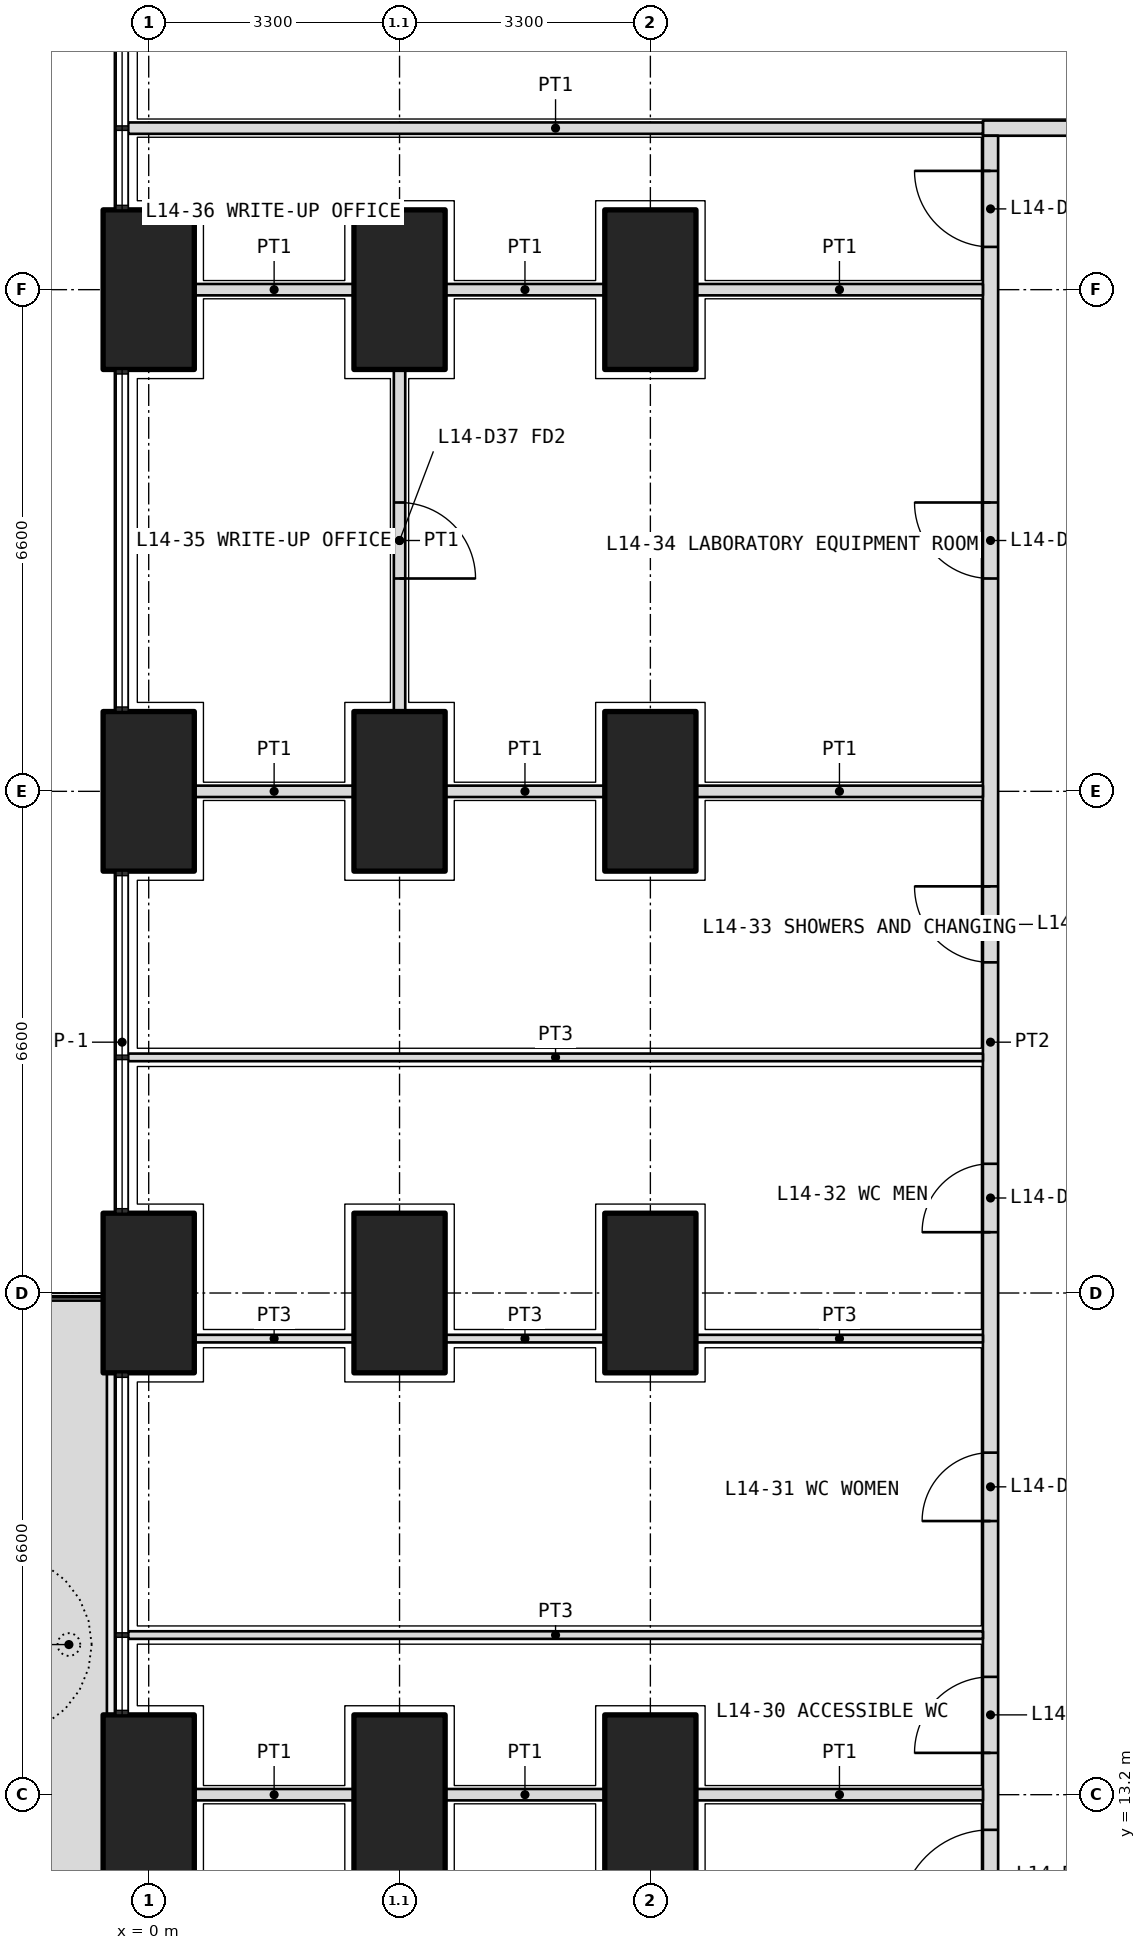
"""IFC4 building model, lengths in metres.
Left out: names, types, materials, properties, quantities, classifications, styles, units other than length and angle.
Written with IfcOpenShell. Run it as: python <this file> out.ifc"""

import sys

from ifc_helpers import new_model, si_unit, direction, frame, frame_2d, origin, origin_2d, place, context, subcontext, project, spatial, polyline, rectangle, outline, extrude, element, fill, save


model = new_model("IFC4")
c1 = context("Model", 3, precision=1e-05, world=origin(), true_north=direction((0.0, 1.0)))
c2 = subcontext(c1, "Body", "Model", "MODEL_VIEW")
j1 = project(units=[si_unit("LENGTHUNIT", "METRE"), si_unit("PLANEANGLEUNIT", "RADIAN")], contexts=[c1])
p1 = place(None, origin())
s1 = spatial("IfcSite", under=j1, at=p1, CompositionType="ELEMENT")
p2 = place(p1, origin())
s2 = spatial("IfcBuilding", under=s1, at=p2, CompositionType="ELEMENT")
p3 = place(p2, frame((0.0, 0.0, 63.3)))
s3 = spatial("IfcBuildingStorey", under=s2, at=p3, CompositionType="ELEMENT", Elevation=63.3)
for number, where, z_axis, x_axis in (
    (1, (0.0, 13.2, 0.0), (0.0, 0.0, 1.0), (0.0, 1.0, 0.0)),
    (2, (0.0, 19.8, 0.0), (0.0, 0.0, 1.0), (0.0, 1.0, 0.0)),
    (3, (0.0, 26.4, 0.0), (0.0, 0.0, 1.0), (0.0, 1.0, 0.0)),
    (4, (0.0, 33.0, 0.0), (0.0, 0.0, 1.0), (0.0, 1.0, 0.0)),
    (5, (3.3, 13.2, 0.0), (0.0, 0.0, 1.0), (0.0, 1.0, 0.0)),
    (6, (3.3, 19.8, 0.0), (0.0, 0.0, 1.0), (0.0, 1.0, 0.0)),
    (7, (3.3, 26.4, 0.0), (0.0, 0.0, 1.0), (0.0, 1.0, 0.0)),
    (8, (3.3, 33.0, 0.0), (0.0, 0.0, 1.0), (0.0, 1.0, 0.0)),
    (9, (6.6, 13.2, 0.0), (0.0, 0.0, 1.0), (0.0, 1.0, 0.0)),
    (10, (6.6, 19.8, 0.0), (0.0, 0.0, 1.0), (0.0, 1.0, 0.0)),
    (11, (6.6, 26.4, 0.0), (0.0, 0.0, 1.0), (0.0, 1.0, 0.0)),
    (12, (6.6, 33.0, 0.0), (0.0, 0.0, 1.0), (0.0, 1.0, 0.0)),
):
    element("IfcColumn", number, at=place(p3, frame(where, z_axis=z_axis, x_axis=x_axis)), inside=s3, PredefinedType="COLUMN", context=c2, shape_type="SweptSolid", body=[
        extrude(rectangle(XDim=2.1, YDim=1.2, at=origin_2d()), origin(), (0.0, 0.0, 1.0), 4.2),
    ])
p4 = place(p3, origin())
e13 = element("IfcWall", 13, at=p4, inside=s3, PredefinedType="USERDEFINED", context=c2, shape_type="SweptSolid", body=[
    extrude(outline(polyline([(-1.55, 10.65), (-0.55, 10.65), (-0.55, 19.7), (-1.55, 19.7), (-1.55, 10.65)]), holes=[polyline([(-1.4, 10.8), (-0.7, 10.8), (-0.7, 19.55), (-1.4, 19.55), (-1.4, 10.8)])]), origin(), (0.0, 0.0, 1.0), 1.05),
])
p5 = place(p3, frame((10.975, 35.125, 0.0), z_axis=(0.0, 0.0, 1.0), x_axis=(1.0, 0.0, 0.0)))
e14 = element("IfcWall", 14, at=p5, inside=s3, PredefinedType="PARTITIONING", context=c2, shape_type="SweptSolid", body=[
    extrude(rectangle(XDim=30.85, YDim=0.2, at=frame_2d((15.425, 0.0))), origin(), (0.0, 0.0, 1.0), 2.85),
])
p6 = place(p5, frame((2.312, 0.0, 0.0)))
e15 = element("IfcOpeningElement", 15, at=p6, cuts=e14, PredefinedType="OPENING", context=c2, shape_type="SweptSolid", body=[
    extrude(rectangle(XDim=1.0, YDim=2.1, at=frame_2d((0.5, 1.05))), frame((0.0, 0.11, 0.0), z_axis=(0.0, -1.0, 0.0), x_axis=(1.0, 0.0, 0.0)), (0.0, 0.0, 1.0), 0.22),
])
p7 = place(p5, frame((13.175, 0.0, 0.0)))
e16 = element("IfcOpeningElement", 16, at=p7, cuts=e14, PredefinedType="OPENING", context=c2, shape_type="SweptSolid", body=[
    extrude(rectangle(XDim=1.2, YDim=2.1, at=frame_2d((0.6, 1.05))), frame((0.0, 0.11, 0.0), z_axis=(0.0, -1.0, 0.0), x_axis=(1.0, 0.0, 0.0)), (0.0, 0.0, 1.0), 0.22),
])
p8 = place(p5, frame((25.788, 0.0, 0.0)))
e17 = element("IfcOpeningElement", 17, at=p8, cuts=e14, PredefinedType="OPENING", context=c2, shape_type="SweptSolid", body=[
    extrude(rectangle(XDim=1.2, YDim=2.1, at=frame_2d((0.6, 1.05))), frame((0.0, 0.11, 0.0), z_axis=(0.0, -1.0, 0.0), x_axis=(1.0, 0.0, 0.0)), (0.0, 0.0, 1.0), 0.22),
])
p9 = place(p3, frame((11.075, 11.175, 0.0), z_axis=(0.0, 0.0, 1.0), x_axis=(0.0, 1.0, 0.0)))
e18 = element("IfcWall", 18, at=p9, inside=s3, PredefinedType="PARTITIONING", context=c2, shape_type="SweptSolid", body=[
    extrude(rectangle(XDim=23.85, YDim=0.2, at=frame_2d((11.925, 0.0))), origin(), (0.0, 0.0, 1.0), 2.85),
])
p10 = place(p9, frame((0.363, 0.0, 0.0)))
e19 = element("IfcOpeningElement", 19, at=p10, cuts=e18, PredefinedType="OPENING", context=c2, shape_type="SweptSolid", body=[
    extrude(rectangle(XDim=1.2, YDim=2.1, at=frame_2d((0.6, 1.05))), frame((0.0, 0.11, 0.0), z_axis=(0.0, -1.0, 0.0), x_axis=(1.0, 0.0, 0.0)), (0.0, 0.0, 1.0), 0.22),
])
p11 = place(p9, frame((2.575, 0.0, 0.0)))
e20 = element("IfcOpeningElement", 20, at=p11, cuts=e18, PredefinedType="OPENING", context=c2, shape_type="SweptSolid", body=[
    extrude(rectangle(XDim=1.0, YDim=2.1, at=frame_2d((0.5, 1.05))), frame((0.0, 0.11, 0.0), z_axis=(0.0, -1.0, 0.0), x_axis=(1.0, 0.0, 0.0)), (0.0, 0.0, 1.0), 0.22),
])
p12 = place(p9, frame((5.625, 0.0, 0.0)))
e21 = element("IfcOpeningElement", 21, at=p12, cuts=e18, PredefinedType="OPENING", context=c2, shape_type="SweptSolid", body=[
    extrude(rectangle(XDim=0.9, YDim=2.1, at=frame_2d((0.45, 1.05))), frame((0.0, 0.11, 0.0), z_axis=(0.0, -1.0, 0.0), x_axis=(1.0, 0.0, 0.0)), (0.0, 0.0, 1.0), 0.22),
])
p13 = place(p9, frame((9.425, 0.0, 0.0)))
e22 = element("IfcOpeningElement", 22, at=p13, cuts=e18, PredefinedType="OPENING", context=c2, shape_type="SweptSolid", body=[
    extrude(rectangle(XDim=0.9, YDim=2.1, at=frame_2d((0.45, 1.05))), frame((0.0, 0.11, 0.0), z_axis=(0.0, -1.0, 0.0), x_axis=(1.0, 0.0, 0.0)), (0.0, 0.0, 1.0), 0.22),
])
p14 = place(p9, frame((12.975, 0.0, 0.0)))
e23 = element("IfcOpeningElement", 23, at=p14, cuts=e18, PredefinedType="OPENING", context=c2, shape_type="SweptSolid", body=[
    extrude(rectangle(XDim=1.0, YDim=2.1, at=frame_2d((0.5, 1.05))), frame((0.0, 0.11, 0.0), z_axis=(0.0, -1.0, 0.0), x_axis=(1.0, 0.0, 0.0)), (0.0, 0.0, 1.0), 0.22),
])
p15 = place(p9, frame((18.025, 0.0, 0.0)))
e24 = element("IfcOpeningElement", 24, at=p15, cuts=e18, PredefinedType="OPENING", context=c2, shape_type="SweptSolid", body=[
    extrude(rectangle(XDim=1.0, YDim=2.1, at=frame_2d((0.5, 1.05))), frame((0.0, 0.11, 0.0), z_axis=(0.0, -1.0, 0.0), x_axis=(1.0, 0.0, 0.0)), (0.0, 0.0, 1.0), 0.22),
])
p16 = place(p9, frame((22.387, 0.0, 0.0)))
e25 = element("IfcOpeningElement", 25, at=p16, cuts=e18, PredefinedType="OPENING", context=c2, shape_type="SweptSolid", body=[
    extrude(rectangle(XDim=1.0, YDim=2.1, at=frame_2d((0.5, 1.05))), frame((0.0, 0.11, 0.0), z_axis=(0.0, -1.0, 0.0), x_axis=(1.0, 0.0, 0.0)), (0.0, 0.0, 1.0), 0.22),
])
p17 = place(p3, frame((-0.27, 35.125, 0.0), z_axis=(0.0, 0.0, 1.0), x_axis=(1.0, 0.0, 0.0)))
e26 = element("IfcWall", 26, at=p17, inside=s3, PredefinedType="PARTITIONING", context=c2, shape_type="SweptSolid", body=[
    extrude(rectangle(XDim=11.245, YDim=0.15, at=frame_2d((5.623, 0.0))), origin(), (0.0, 0.0, 1.0), 2.6),
])
p18 = place(p3, frame((3.3, 31.95, 0.0), z_axis=(0.0, 0.0, 1.0), x_axis=(0.0, -1.0, 0.0)))
e27 = element("IfcWall", 27, at=p18, inside=s3, PredefinedType="PARTITIONING", context=c2, shape_type="SweptSolid", body=[
    extrude(rectangle(XDim=4.5, YDim=0.15, at=frame_2d((2.25, 0.0))), origin(), (0.0, 0.0, 1.0), 3.9),
])
p19 = place(p18, frame((1.75, 0.0, 0.0)))
e28 = element("IfcOpeningElement", 28, at=p19, cuts=e27, PredefinedType="OPENING", context=c2, shape_type="SweptSolid", body=[
    extrude(rectangle(XDim=1.0, YDim=2.1, at=frame_2d((0.5, 1.05))), frame((0.0, 0.085, 0.0), z_axis=(0.0, -1.0, 0.0), x_axis=(1.0, 0.0, 0.0)), (0.0, 0.0, 1.0), 0.17),
])
p20 = place(p3, frame((-0.27, 15.3, 0.0), z_axis=(0.0, 0.0, 1.0), x_axis=(1.0, 0.0, 0.0)))
e29 = element("IfcWall", 29, at=p20, inside=s3, PredefinedType="PARTITIONING", context=c2, shape_type="SweptSolid", body=[
    extrude(rectangle(XDim=11.245, YDim=0.1, at=frame_2d((5.623, 0.0))), origin(), (0.0, 0.0, 1.0), 2.6),
])
p21 = place(p3, frame((0.6, 19.2, 0.0), z_axis=(0.0, 0.0, 1.0), x_axis=(1.0, 0.0, 0.0)))
e30 = element("IfcWall", 30, at=p21, inside=s3, PredefinedType="PARTITIONING", context=c2, shape_type="SweptSolid", body=[
    extrude(rectangle(XDim=2.1, YDim=0.1, at=frame_2d((1.05, 0.0))), origin(), (0.0, 0.0, 1.0), 2.85),
])
p22 = place(p3, frame((3.9, 19.2, 0.0), z_axis=(0.0, 0.0, 1.0), x_axis=(1.0, 0.0, 0.0)))
e31 = element("IfcWall", 31, at=p22, inside=s3, PredefinedType="PARTITIONING", context=c2, shape_type="SweptSolid", body=[
    extrude(rectangle(XDim=2.1, YDim=0.1, at=frame_2d((1.05, 0.0))), origin(), (0.0, 0.0, 1.0), 2.85),
])
p23 = place(p3, frame((7.2, 19.2, 0.0), z_axis=(0.0, 0.0, 1.0), x_axis=(1.0, 0.0, 0.0)))
e32 = element("IfcWall", 32, at=p23, inside=s3, PredefinedType="PARTITIONING", context=c2, shape_type="SweptSolid", body=[
    extrude(rectangle(XDim=3.775, YDim=0.1, at=frame_2d((1.888, 0.0))), origin(), (0.0, 0.0, 1.0), 2.85),
])
p24 = place(p3, frame((-0.27, 22.9, 0.0), z_axis=(0.0, 0.0, 1.0), x_axis=(1.0, 0.0, 0.0)))
e33 = element("IfcWall", 33, at=p24, inside=s3, PredefinedType="PARTITIONING", context=c2, shape_type="SweptSolid", body=[
    extrude(rectangle(XDim=11.245, YDim=0.1, at=frame_2d((5.623, 0.0))), origin(), (0.0, 0.0, 1.0), 2.6),
])
p25 = place(p3, frame((0.6, 13.2, 0.0), z_axis=(0.0, 0.0, 1.0), x_axis=(1.0, 0.0, 0.0)))
e34 = element("IfcWall", 34, at=p25, inside=s3, PredefinedType="PARTITIONING", context=c2, shape_type="SweptSolid", body=[
    extrude(rectangle(XDim=2.1, YDim=0.15, at=frame_2d((1.05, 0.0))), origin(), (0.0, 0.0, 1.0), 2.85),
])
p26 = place(p3, frame((3.9, 13.2, 0.0), z_axis=(0.0, 0.0, 1.0), x_axis=(1.0, 0.0, 0.0)))
e35 = element("IfcWall", 35, at=p26, inside=s3, PredefinedType="PARTITIONING", context=c2, shape_type="SweptSolid", body=[
    extrude(rectangle(XDim=2.1, YDim=0.15, at=frame_2d((1.05, 0.0))), origin(), (0.0, 0.0, 1.0), 2.85),
])
p27 = place(p3, frame((7.2, 13.2, 0.0), z_axis=(0.0, 0.0, 1.0), x_axis=(1.0, 0.0, 0.0)))
e36 = element("IfcWall", 36, at=p27, inside=s3, PredefinedType="PARTITIONING", context=c2, shape_type="SweptSolid", body=[
    extrude(rectangle(XDim=3.775, YDim=0.15, at=frame_2d((1.888, 0.0))), origin(), (0.0, 0.0, 1.0), 2.85),
])
p28 = place(p3, frame((0.6, 26.4, 0.0), z_axis=(0.0, 0.0, 1.0), x_axis=(1.0, 0.0, 0.0)))
e37 = element("IfcWall", 37, at=p28, inside=s3, PredefinedType="PARTITIONING", context=c2, shape_type="SweptSolid", body=[
    extrude(rectangle(XDim=2.1, YDim=0.15, at=frame_2d((1.05, 0.0))), origin(), (0.0, 0.0, 1.0), 2.85),
])
p29 = place(p3, frame((3.9, 26.4, 0.0), z_axis=(0.0, 0.0, 1.0), x_axis=(1.0, 0.0, 0.0)))
e38 = element("IfcWall", 38, at=p29, inside=s3, PredefinedType="PARTITIONING", context=c2, shape_type="SweptSolid", body=[
    extrude(rectangle(XDim=2.1, YDim=0.15, at=frame_2d((1.05, 0.0))), origin(), (0.0, 0.0, 1.0), 2.85),
])
p30 = place(p3, frame((7.2, 26.4, 0.0), z_axis=(0.0, 0.0, 1.0), x_axis=(1.0, 0.0, 0.0)))
e39 = element("IfcWall", 39, at=p30, inside=s3, PredefinedType="PARTITIONING", context=c2, shape_type="SweptSolid", body=[
    extrude(rectangle(XDim=3.775, YDim=0.15, at=frame_2d((1.888, 0.0))), origin(), (0.0, 0.0, 1.0), 2.85),
])
p31 = place(p3, frame((0.6, 33.0, 0.0), z_axis=(0.0, 0.0, 1.0), x_axis=(1.0, 0.0, 0.0)))
e40 = element("IfcWall", 40, at=p31, inside=s3, PredefinedType="PARTITIONING", context=c2, shape_type="SweptSolid", body=[
    extrude(rectangle(XDim=2.1, YDim=0.15, at=frame_2d((1.05, 0.0))), origin(), (0.0, 0.0, 1.0), 2.85),
])
p32 = place(p3, frame((3.9, 33.0, 0.0), z_axis=(0.0, 0.0, 1.0), x_axis=(1.0, 0.0, 0.0)))
e41 = element("IfcWall", 41, at=p32, inside=s3, PredefinedType="PARTITIONING", context=c2, shape_type="SweptSolid", body=[
    extrude(rectangle(XDim=2.1, YDim=0.15, at=frame_2d((1.05, 0.0))), origin(), (0.0, 0.0, 1.0), 2.85),
])
p33 = place(p3, frame((7.2, 33.0, 0.0), z_axis=(0.0, 0.0, 1.0), x_axis=(1.0, 0.0, 0.0)))
e42 = element("IfcWall", 42, at=p33, inside=s3, PredefinedType="PARTITIONING", context=c2, shape_type="SweptSolid", body=[
    extrude(rectangle(XDim=3.775, YDim=0.15, at=frame_2d((1.888, 0.0))), origin(), (0.0, 0.0, 1.0), 2.85),
])
p34 = place(p10, origin())
e43 = element("IfcDoor", 43, at=p34, inside=s3, OperationType="DOUBLE_DOOR_SINGLE_SWING", PredefinedType="DOOR", context=c2, shape_type="SweptSolid", body=[
    extrude(rectangle(XDim=1.2, YDim=2.1, at=frame_2d((0.6, 1.05))), frame((0.0, 0.025, 0.0), z_axis=(0.0, -1.0, 0.0), x_axis=(1.0, 0.0, 0.0)), (0.0, 0.0, 1.0), 0.05),
])
fill(e19, e43)
p35 = place(p11, origin())
e44 = element("IfcDoor", 44, at=p35, inside=s3, OperationType="SINGLE_SWING_LEFT", PredefinedType="DOOR", context=c2, shape_type="SweptSolid", body=[
    extrude(rectangle(XDim=1.0, YDim=2.1, at=frame_2d((0.5, 1.05))), frame((0.0, 0.025, 0.0), z_axis=(0.0, -1.0, 0.0), x_axis=(1.0, 0.0, 0.0)), (0.0, 0.0, 1.0), 0.05),
])
fill(e20, e44)
p36 = place(p12, origin())
e45 = element("IfcDoor", 45, at=p36, inside=s3, OperationType="SINGLE_SWING_LEFT", PredefinedType="DOOR", context=c2, shape_type="SweptSolid", body=[
    extrude(rectangle(XDim=0.9, YDim=2.1, at=frame_2d((0.45, 1.05))), frame((0.0, 0.025, 0.0), z_axis=(0.0, -1.0, 0.0), x_axis=(1.0, 0.0, 0.0)), (0.0, 0.0, 1.0), 0.05),
])
fill(e21, e45)
p37 = place(p13, origin())
e46 = element("IfcDoor", 46, at=p37, inside=s3, OperationType="SINGLE_SWING_LEFT", PredefinedType="DOOR", context=c2, shape_type="SweptSolid", body=[
    extrude(rectangle(XDim=0.9, YDim=2.1, at=frame_2d((0.45, 1.05))), frame((0.0, 0.025, 0.0), z_axis=(0.0, -1.0, 0.0), x_axis=(1.0, 0.0, 0.0)), (0.0, 0.0, 1.0), 0.05),
])
fill(e22, e46)
p38 = place(p14, origin())
e47 = element("IfcDoor", 47, at=p38, inside=s3, OperationType="SINGLE_SWING_RIGHT", PredefinedType="DOOR", context=c2, shape_type="SweptSolid", body=[
    extrude(rectangle(XDim=1.0, YDim=2.1, at=frame_2d((0.5, 1.05))), frame((0.0, 0.025, 0.0), z_axis=(0.0, -1.0, 0.0), x_axis=(1.0, 0.0, 0.0)), (0.0, 0.0, 1.0), 0.05),
])
fill(e23, e47)
p39 = place(p15, origin())
e48 = element("IfcDoor", 48, at=p39, inside=s3, OperationType="SINGLE_SWING_RIGHT", PredefinedType="DOOR", context=c2, shape_type="SweptSolid", body=[
    extrude(rectangle(XDim=1.0, YDim=2.1, at=frame_2d((0.5, 1.05))), frame((0.0, 0.025, 0.0), z_axis=(0.0, -1.0, 0.0), x_axis=(1.0, 0.0, 0.0)), (0.0, 0.0, 1.0), 0.05),
])
fill(e24, e48)
p40 = place(p19, origin())
e49 = element("IfcDoor", 49, at=p40, inside=s3, OperationType="SINGLE_SWING_RIGHT", PredefinedType="DOOR", context=c2, shape_type="SweptSolid", body=[
    extrude(rectangle(XDim=1.0, YDim=2.1, at=frame_2d((0.5, 1.05))), frame((0.0, 0.025, 0.0), z_axis=(0.0, -1.0, 0.0), x_axis=(1.0, 0.0, 0.0)), (0.0, 0.0, 1.0), 0.05),
])
fill(e28, e49)
p41 = place(p16, origin())
e50 = element("IfcDoor", 50, at=p41, inside=s3, OperationType="SINGLE_SWING_RIGHT", PredefinedType="DOOR", context=c2, shape_type="SweptSolid", body=[
    extrude(rectangle(XDim=1.0, YDim=2.1, at=frame_2d((0.5, 1.05))), frame((0.0, 0.025, 0.0), z_axis=(0.0, -1.0, 0.0), x_axis=(1.0, 0.0, 0.0)), (0.0, 0.0, 1.0), 0.05),
])
fill(e25, e50)
save(model, sys.argv[1])
